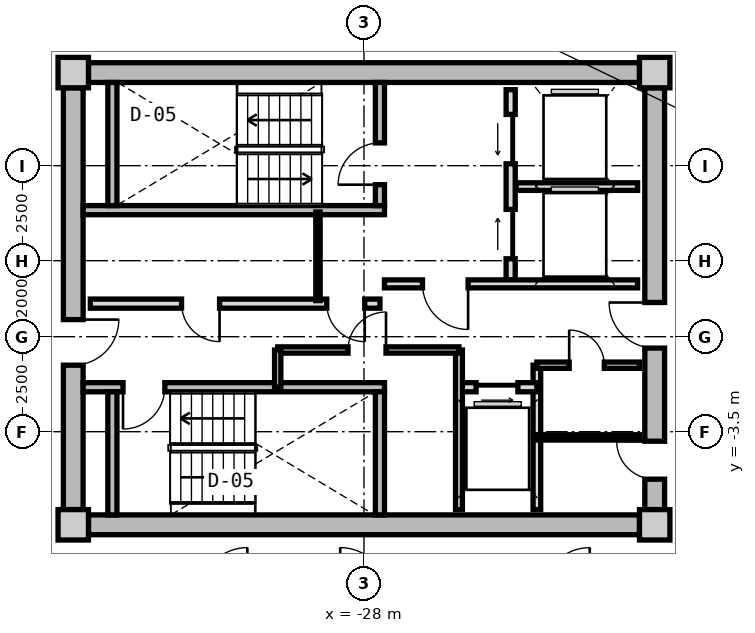
"""IFC4 building model, lengths in metres.
Left out: names, types, materials, properties, quantities, classifications, styles, units other than length and angle.
Written with IfcOpenShell. Run it as: python <this file> out.ifc"""

import sys

from ifc_helpers import new_model, si_unit, direction, frame, frame_2d, origin, origin_2d, place, context, subcontext, project, spatial, rectangle, extrude, source, transform, mapped, element, fill, save


model = new_model("IFC4")
c1 = context("Model", 3, precision=1e-05, world=origin(), true_north=direction((0.0, 1.0)))
c2 = subcontext(c1, "Body", "Model", "MODEL_VIEW")
j1 = project(units=[si_unit("LENGTHUNIT", "METRE"), si_unit("PLANEANGLEUNIT", "RADIAN")], contexts=[c1])
p1 = place(None, origin())
s1 = spatial("IfcSite", under=j1, at=p1, CompositionType="ELEMENT")
p2 = place(p1, origin())
s2 = spatial("IfcBuilding", under=s1, at=p2, CompositionType="ELEMENT")
p3 = place(p2, frame((0.0, 0.0, 210.85)))
s3 = spatial("IfcBuildingStorey", under=s2, at=p3, CompositionType="ELEMENT", Elevation=210.85)
m1 = source(origin(), c2, "Body", "SweptSolid", [
    extrude(rectangle(XDim=0.8, YDim=0.8, at=origin_2d()), origin(), (0.0, 0.0, 1.0), 3.05),
])
for number, where, z_axis, x_axis in (
    (1, (-35.65, -5.95, 0.0), (0.0, 0.0, 1.0), (1.0, 0.0, 0.0)),
    (2, (-20.35, -5.95, 0.0), (0.0, 0.0, 1.0), (1.0, 0.0, 0.0)),
    (3, (-20.35, 5.95, 0.0), (0.0, 0.0, 1.0), (1.0, 0.0, 0.0)),
    (4, (-35.65, 5.95, 0.0), (0.0, 0.0, 1.0), (1.0, 0.0, 0.0)),
):
    element("IfcColumn", number, at=place(p3, frame(where, z_axis=z_axis, x_axis=x_axis)), inside=s3, PredefinedType="COLUMN", context=c2, shape_type="MappedRepresentation", body=[
        mapped(m1, transform((0.0, 0.0, 0.0), x_axis=(1.0, 0.0, 0.0), y_axis=(0.0, 1.0, 0.0), z_axis=(0.0, 0.0, 1.0), scale=1.0)),
    ])
m2 = source(origin(), c2, "Body", "SweptSolid", [
    extrude(rectangle(XDim=14.5, YDim=0.52, at=frame_2d((7.25, 0.0))), origin(), (0.0, 0.0, 1.0), 2.76),
])
for number, where, z_axis, x_axis in (
    (5, (-35.25, 5.95, 0.0), (0.0, 0.0, 1.0), (1.0, 0.0, 0.0)),
    (6, (-20.75, -5.95, 0.0), (0.0, 0.0, 1.0), (-1.0, 0.0, 0.0)),
):
    element("IfcWall", number, at=place(p3, frame(where, z_axis=z_axis, x_axis=x_axis)), inside=s3, PredefinedType="SHEAR", context=c2, shape_type="MappedRepresentation", body=[
        mapped(m2, transform((0.0, 0.0, 0.0), x_axis=(1.0, 0.0, 0.0), y_axis=(0.0, 1.0, 0.0), z_axis=(0.0, 0.0, 1.0), scale=1.0)),
    ])
m3 = source(origin(), c2, "Body", "SweptSolid", [
    extrude(rectangle(XDim=11.1, YDim=0.52, at=frame_2d((5.55, 0.0))), origin(), (0.0, 0.0, 1.0), 2.76),
])
p4 = place(p3, frame((-35.65, -5.55, 0.0), z_axis=(0.0, 0.0, 1.0), x_axis=(0.0, 1.0, 0.0)))
e7 = element("IfcWall", 7, at=p4, inside=s3, PredefinedType="SHEAR", context=c2, shape_type="MappedRepresentation", body=[
    mapped(m3, transform((0.0, 0.0, 0.0), x_axis=(1.0, 0.0, 0.0), y_axis=(0.0, 1.0, 0.0), z_axis=(0.0, 0.0, 1.0), scale=1.0)),
])
p5 = place(p4, frame((3.8, 0.0, 0.0)))
e8 = element("IfcOpeningElement", 8, at=p5, cuts=e7, PredefinedType="OPENING", context=c2, shape_type="SweptSolid", body=[
    extrude(rectangle(XDim=1.2, YDim=2.15, at=frame_2d((0.6, 1.075))), frame((0.0, 0.27, 0.0), z_axis=(0.0, -1.0, 0.0), x_axis=(1.0, 0.0, 0.0)), (0.0, 0.0, 1.0), 0.54),
])
p6 = place(p3, frame((-20.35, 5.55, 0.0), z_axis=(0.0, 0.0, 1.0), x_axis=(0.0, -1.0, 0.0)))
e9 = element("IfcWall", 9, at=p6, inside=s3, PredefinedType="SHEAR", context=c2, shape_type="MappedRepresentation", body=[
    mapped(m3, transform((0.0, 0.0, 0.0), x_axis=(1.0, 0.0, 0.0), y_axis=(0.0, 1.0, 0.0), z_axis=(0.0, 0.0, 1.0), scale=1.0)),
])
p7 = place(p6, frame((5.65, 0.0, 0.0)))
e10 = element("IfcOpeningElement", 10, at=p7, cuts=e9, PredefinedType="OPENING", context=c2, shape_type="SweptSolid", body=[
    extrude(rectangle(XDim=1.2, YDim=2.15, at=frame_2d((0.6, 1.075))), frame((0.0, 0.27, 0.0), z_axis=(0.0, -1.0, 0.0), x_axis=(1.0, 0.0, 0.0)), (0.0, 0.0, 1.0), 0.54),
])
p8 = place(p6, frame((9.3, 0.0, 0.0)))
e11 = element("IfcOpeningElement", 11, at=p8, cuts=e9, PredefinedType="OPENING", context=c2, shape_type="SweptSolid", body=[
    extrude(rectangle(XDim=1.0, YDim=2.1, at=frame_2d((0.5, 1.05))), frame((0.0, 0.27, 0.0), z_axis=(0.0, -1.0, 0.0), x_axis=(1.0, 0.0, 0.0)), (0.0, 0.0, 1.0), 0.54),
])
m4 = source(origin(), c2, "Body", "SweptSolid", [
    extrude(rectangle(XDim=7.93, YDim=0.24, at=frame_2d((3.965, 0.0))), origin(), (0.0, 0.0, 1.0), 2.76),
])
p9 = place(p3, frame((-35.39, 2.33, 0.0), z_axis=(0.0, 0.0, 1.0), x_axis=(1.0, 0.0, 0.0)))
e12 = element("IfcWall", 12, at=p9, inside=s3, PredefinedType="PARTITIONING", context=c2, shape_type="MappedRepresentation", body=[
    mapped(m4, transform((0.0, 0.0, 0.0), x_axis=(1.0, 0.0, 0.0), y_axis=(0.0, 1.0, 0.0), z_axis=(0.0, 0.0, 1.0), scale=1.0)),
])
m5 = source(origin(), c2, "Body", "SweptSolid", [
    extrude(rectangle(XDim=3.24, YDim=0.24, at=frame_2d((1.62, 0.0))), origin(), (0.0, 0.0, 1.0), 2.76),
])
p10 = place(p3, frame((-34.62, 2.45, 0.0), z_axis=(0.0, 0.0, 1.0), x_axis=(0.0, 1.0, 0.0)))
e13 = element("IfcWall", 13, at=p10, inside=s3, PredefinedType="PARTITIONING", context=c2, shape_type="MappedRepresentation", body=[
    mapped(m5, transform((0.0, 0.0, 0.0), x_axis=(1.0, 0.0, 0.0), y_axis=(0.0, 1.0, 0.0), z_axis=(0.0, 0.0, 1.0), scale=1.0)),
])
p11 = place(p3, frame((-27.58, 2.45, 0.0), z_axis=(0.0, 0.0, 1.0), x_axis=(0.0, 1.0, 0.0)))
e14 = element("IfcWall", 14, at=p11, inside=s3, PredefinedType="PARTITIONING", context=c2, shape_type="MappedRepresentation", body=[
    mapped(m5, transform((0.0, 0.0, 0.0), x_axis=(1.0, 0.0, 0.0), y_axis=(0.0, 1.0, 0.0), z_axis=(0.0, 0.0, 1.0), scale=1.0)),
])
p12 = place(p11, frame((0.55, 0.0, 0.0)))
e15 = element("IfcOpeningElement", 15, at=p12, cuts=e14, PredefinedType="OPENING", context=c2, shape_type="SweptSolid", body=[
    extrude(rectangle(XDim=1.1, YDim=2.15, at=frame_2d((0.55, 1.075))), frame((0.0, 0.13, 0.0), z_axis=(0.0, -1.0, 0.0), x_axis=(1.0, 0.0, 0.0)), (0.0, 0.0, 1.0), 0.26),
])
p13 = place(p3, frame((-35.39, -2.33, 0.0), z_axis=(0.0, 0.0, 1.0), x_axis=(1.0, 0.0, 0.0)))
e16 = element("IfcWall", 16, at=p13, inside=s3, PredefinedType="PARTITIONING", context=c2, shape_type="MappedRepresentation", body=[
    mapped(m4, transform((0.0, 0.0, 0.0), x_axis=(1.0, 0.0, 0.0), y_axis=(0.0, 1.0, 0.0), z_axis=(0.0, 0.0, 1.0), scale=1.0)),
])
p14 = place(p13, frame((1.05, 0.0, 0.0)))
e17 = element("IfcOpeningElement", 17, at=p14, cuts=e16, PredefinedType="OPENING", context=c2, shape_type="SweptSolid", body=[
    extrude(rectangle(XDim=1.1, YDim=2.15, at=frame_2d((0.55, 1.075))), frame((0.0, 0.13, 0.0), z_axis=(0.0, -1.0, 0.0), x_axis=(1.0, 0.0, 0.0)), (0.0, 0.0, 1.0), 0.26),
])
for number, where, z_axis, x_axis in (
    (18, (-34.62, -5.69, 0.0), (0.0, 0.0, 1.0), (0.0, 1.0, 0.0)),
    (19, (-27.58, -5.69, 0.0), (0.0, 0.0, 1.0), (0.0, 1.0, 0.0)),
):
    element("IfcWall", number, at=place(p3, frame(where, z_axis=z_axis, x_axis=x_axis)), inside=s3, PredefinedType="PARTITIONING", context=c2, shape_type="MappedRepresentation", body=[
        mapped(m5, transform((0.0, 0.0, 0.0), x_axis=(1.0, 0.0, 0.0), y_axis=(0.0, 1.0, 0.0), z_axis=(0.0, 0.0, 1.0), scale=1.0)),
    ])
m6 = source(origin(), c2, "Body", "SweptSolid", [
    extrude(rectangle(XDim=5.0, YDim=0.24, at=frame_2d((2.5, 0.0))), origin(), (0.0, 0.0, 1.0), 2.745),
])
p15 = place(p3, frame((-24.14, 0.5, 0.0), z_axis=(0.0, 0.0, 1.0), x_axis=(0.0, 1.0, 0.0)))
e20 = element("IfcWall", 20, at=p15, inside=s3, PredefinedType="PARTITIONING", context=c2, shape_type="MappedRepresentation", body=[
    mapped(m6, transform((0.0, 0.0, 0.0), x_axis=(1.0, 0.0, 0.0), y_axis=(0.0, 1.0, 0.0), z_axis=(0.0, 0.0, 1.0), scale=1.0)),
])
p16 = place(p15, frame((3.05, 0.0, 0.0)))
e21 = element("IfcOpeningElement", 21, at=p16, cuts=e20, PredefinedType="OPENING", context=c2, shape_type="SweptSolid", body=[
    extrude(rectangle(XDim=1.3, YDim=2.2, at=frame_2d((0.65, 1.1))), frame((0.0, 0.13, 0.0), z_axis=(0.0, -1.0, 0.0), x_axis=(1.0, 0.0, 0.0)), (0.0, 0.0, 1.0), 0.26),
])
p17 = place(p15, frame((0.55, 0.0, 0.0)))
e22 = element("IfcOpeningElement", 22, at=p17, cuts=e20, PredefinedType="OPENING", context=c2, shape_type="SweptSolid", body=[
    extrude(rectangle(XDim=1.3, YDim=2.2, at=frame_2d((0.65, 1.1))), frame((0.0, 0.13, 0.0), z_axis=(0.0, -1.0, 0.0), x_axis=(1.0, 0.0, 0.0)), (0.0, 0.0, 1.0), 0.26),
])
m7 = source(origin(), c2, "Body", "SweptSolid", [
    extrude(rectangle(XDim=3.2, YDim=0.2, at=frame_2d((1.6, 0.0))), origin(), (0.0, 0.0, 1.0), 2.745),
])
p18 = place(p3, frame((-24.0, 2.95, 0.0), z_axis=(0.0, 0.0, 1.0), x_axis=(1.0, 0.0, 0.0)))
e23 = element("IfcWall", 23, at=p18, inside=s3, PredefinedType="PARTITIONING", context=c2, shape_type="MappedRepresentation", body=[
    mapped(m7, transform((0.0, 0.0, 0.0), x_axis=(1.0, 0.0, 0.0), y_axis=(0.0, 1.0, 0.0), z_axis=(0.0, 0.0, 1.0), scale=1.0)),
])
m8 = source(origin(), c2, "Body", "SweptSolid", [
    extrude(rectangle(XDim=6.66, YDim=0.21, at=frame_2d((3.33, 0.0))), origin(), (0.0, 0.0, 1.0), 2.745),
])
p19 = place(p3, frame((-27.46, 0.39, 0.0), z_axis=(0.0, 0.0, 1.0), x_axis=(1.0, 0.0, 0.0)))
e24 = element("IfcWall", 24, at=p19, inside=s3, PredefinedType="PARTITIONING", context=c2, shape_type="MappedRepresentation", body=[
    mapped(m8, transform((0.0, 0.0, 0.0), x_axis=(1.0, 0.0, 0.0), y_axis=(0.0, 1.0, 0.0), z_axis=(0.0, 0.0, 1.0), scale=1.0)),
])
p20 = place(p19, frame((1.0, 0.0, 0.0)))
e25 = element("IfcOpeningElement", 25, at=p20, cuts=e24, PredefinedType="OPENING", context=c2, shape_type="SweptSolid", body=[
    extrude(rectangle(XDim=1.2, YDim=2.15, at=frame_2d((0.6, 1.075))), frame((0.0, 0.115, 0.0), z_axis=(0.0, -1.0, 0.0), x_axis=(1.0, 0.0, 0.0)), (0.0, 0.0, 1.0), 0.23),
])
m9 = source(origin(), c2, "Body", "SweptSolid", [
    extrude(rectangle(XDim=7.62, YDim=0.24, at=frame_2d((3.81, 0.0))), origin(), (0.0, 0.0, 1.0), 2.745),
])
p21 = place(p3, frame((-35.2, -0.13, 0.0), z_axis=(0.0, 0.0, 1.0), x_axis=(1.0, 0.0, 0.0)))
e26 = element("IfcWall", 26, at=p21, inside=s3, PredefinedType="PARTITIONING", context=c2, shape_type="MappedRepresentation", body=[
    mapped(m9, transform((0.0, 0.0, 0.0), x_axis=(1.0, 0.0, 0.0), y_axis=(0.0, 1.0, 0.0), z_axis=(0.0, 0.0, 1.0), scale=1.0)),
])
p22 = place(p21, frame((6.22, 0.0, 0.0)))
e27 = element("IfcOpeningElement", 27, at=p22, cuts=e26, PredefinedType="OPENING", context=c2, shape_type="SweptSolid", body=[
    extrude(rectangle(XDim=1.0, YDim=2.1, at=frame_2d((0.5, 1.05))), frame((0.0, 0.13, 0.0), z_axis=(0.0, -1.0, 0.0), x_axis=(1.0, 0.0, 0.0)), (0.0, 0.0, 1.0), 0.26),
])
p23 = place(p21, frame((2.4, 0.0, 0.0)))
e28 = element("IfcOpeningElement", 28, at=p23, cuts=e26, PredefinedType="OPENING", context=c2, shape_type="SweptSolid", body=[
    extrude(rectangle(XDim=1.0, YDim=2.1, at=frame_2d((0.5, 1.05))), frame((0.0, 0.13, 0.0), z_axis=(0.0, -1.0, 0.0), x_axis=(1.0, 0.0, 0.0)), (0.0, 0.0, 1.0), 0.26),
])
m10 = source(origin(), c2, "Body", "SweptSolid", [
    extrude(rectangle(XDim=2.33, YDim=0.115, at=frame_2d((1.165, 0.0))), origin(), (0.0, 0.0, 1.0), 2.745),
])
p24 = place(p3, frame((-29.21, -0.05, 0.0), z_axis=(0.0, 0.0, 1.0), x_axis=(0.0, 1.0, 0.0)))
e29 = element("IfcWall", 29, at=p24, inside=s3, PredefinedType="PARTITIONING", context=c2, shape_type="MappedRepresentation", body=[
    mapped(m10, transform((0.0, 0.0, 0.0), x_axis=(1.0, 0.0, 0.0), y_axis=(0.0, 1.0, 0.0), z_axis=(0.0, 0.0, 1.0), scale=1.0)),
])
m11 = source(origin(), c2, "Body", "SweptSolid", [
    extrude(rectangle(XDim=3.8, YDim=0.2, at=frame_2d((1.9, 0.0))), origin(), (0.0, 0.0, 1.0), 2.745),
])
p25 = place(p3, frame((-23.45, -5.55, 0.0), z_axis=(0.0, 0.0, 1.0), x_axis=(0.0, 1.0, 0.0)))
e30 = element("IfcWall", 30, at=p25, inside=s3, PredefinedType="PARTITIONING", context=c2, shape_type="MappedRepresentation", body=[
    mapped(m11, transform((0.0, 0.0, 0.0), x_axis=(1.0, 0.0, 0.0), y_axis=(0.0, 1.0, 0.0), z_axis=(0.0, 0.0, 1.0), scale=1.0)),
])
m12 = source(origin(), c2, "Body", "SweptSolid", [
    extrude(rectangle(XDim=2.05, YDim=0.24, at=frame_2d((1.025, 0.0))), origin(), (0.0, 0.0, 1.0), 2.745),
])
p26 = place(p3, frame((-25.5, -2.33, 0.0), z_axis=(0.0, 0.0, 1.0), x_axis=(1.0, 0.0, 0.0)))
e31 = element("IfcWall", 31, at=p26, inside=s3, PredefinedType="PARTITIONING", context=c2, shape_type="MappedRepresentation", body=[
    mapped(m12, transform((0.0, 0.0, 0.0), x_axis=(1.0, 0.0, 0.0), y_axis=(0.0, 1.0, 0.0), z_axis=(0.0, 0.0, 1.0), scale=1.0)),
])
p27 = place(p26, frame((0.45, 0.0, 0.0)))
e32 = element("IfcOpeningElement", 32, at=p27, cuts=e31, PredefinedType="OPENING", context=c2, shape_type="SweptSolid", body=[
    extrude(rectangle(XDim=1.1, YDim=2.2, at=frame_2d((0.55, 1.1))), frame((0.0, 0.13, 0.0), z_axis=(0.0, -1.0, 0.0), x_axis=(1.0, 0.0, 0.0)), (0.0, 0.0, 1.0), 0.26),
])
m13 = source(origin(), c2, "Body", "SweptSolid", [
    extrude(rectangle(XDim=4.2, YDim=0.18, at=frame_2d((2.1, 0.0))), origin(), (0.0, 0.0, 1.0), 2.745),
])
p28 = place(p3, frame((-25.5, -5.55, 0.0), z_axis=(0.0, 0.0, 1.0), x_axis=(0.0, 1.0, 0.0)))
e33 = element("IfcWall", 33, at=p28, inside=s3, PredefinedType="PARTITIONING", context=c2, shape_type="MappedRepresentation", body=[
    mapped(m13, transform((0.0, 0.0, 0.0), x_axis=(1.0, 0.0, 0.0), y_axis=(0.0, 1.0, 0.0), z_axis=(0.0, 0.0, 1.0), scale=1.0)),
])
m14 = source(origin(), c2, "Body", "SweptSolid", [
    extrude(rectangle(XDim=4.77, YDim=0.165, at=frame_2d((2.385, 0.0))), origin(), (0.0, 0.0, 1.0), 2.745),
])
p29 = place(p3, frame((-30.27, -1.35, 0.0), z_axis=(0.0, 0.0, 1.0), x_axis=(1.0, 0.0, 0.0)))
e34 = element("IfcWall", 34, at=p29, inside=s3, PredefinedType="PARTITIONING", context=c2, shape_type="MappedRepresentation", body=[
    mapped(m14, transform((0.0, 0.0, 0.0), x_axis=(1.0, 0.0, 0.0), y_axis=(0.0, 1.0, 0.0), z_axis=(0.0, 0.0, 1.0), scale=1.0)),
])
p30 = place(p29, frame((1.85, 0.0, 0.0)))
e35 = element("IfcOpeningElement", 35, at=p30, cuts=e34, PredefinedType="OPENING", context=c2, shape_type="SweptSolid", body=[
    extrude(rectangle(XDim=1.0, YDim=2.1, at=frame_2d((0.5, 1.05))), frame((0.0, 0.093, 0.0), z_axis=(0.0, -1.0, 0.0), x_axis=(1.0, 0.0, 0.0)), (0.0, 0.0, 1.0), 0.185),
])
m15 = source(origin(), c2, "Body", "SweptSolid", [
    extrude(rectangle(XDim=0.98, YDim=0.165, at=frame_2d((0.49, 0.0))), origin(), (0.0, 0.0, 1.0), 2.745),
])
p31 = place(p3, frame((-30.27, -2.33, 0.0), z_axis=(0.0, 0.0, 1.0), x_axis=(0.0, 1.0, 0.0)))
e36 = element("IfcWall", 36, at=p31, inside=s3, PredefinedType="PARTITIONING", context=c2, shape_type="MappedRepresentation", body=[
    mapped(m15, transform((0.0, 0.0, 0.0), x_axis=(1.0, 0.0, 0.0), y_axis=(0.0, 1.0, 0.0), z_axis=(0.0, 0.0, 1.0), scale=1.0)),
])
m16 = source(origin(), c2, "Body", "SweptSolid", [
    extrude(rectangle(XDim=2.7, YDim=0.165, at=frame_2d((1.35, 0.0))), origin(), (0.0, 0.0, 1.0), 2.745),
])
p32 = place(p3, frame((-23.45, -1.75, 0.0), z_axis=(0.0, 0.0, 1.0), x_axis=(1.0, 0.0, 0.0)))
e37 = element("IfcWall", 37, at=p32, inside=s3, PredefinedType="PARTITIONING", context=c2, shape_type="MappedRepresentation", body=[
    mapped(m16, transform((0.0, 0.0, 0.0), x_axis=(1.0, 0.0, 0.0), y_axis=(0.0, 1.0, 0.0), z_axis=(0.0, 0.0, 1.0), scale=1.0)),
])
p33 = place(p32, frame((0.85, 0.0, 0.0)))
e38 = element("IfcOpeningElement", 38, at=p33, cuts=e37, PredefinedType="OPENING", context=c2, shape_type="SweptSolid", body=[
    extrude(rectangle(XDim=0.925, YDim=2.1, at=frame_2d((0.462, 1.05))), frame((0.0, 0.093, 0.0), z_axis=(0.0, -1.0, 0.0), x_axis=(1.0, 0.0, 0.0)), (0.0, 0.0, 1.0), 0.185),
])
m17 = source(origin(), c2, "Body", "SweptSolid", [
    extrude(rectangle(XDim=2.7, YDim=0.14, at=frame_2d((1.35, 0.0))), origin(), (0.0, 0.0, 1.0), 2.745),
])
p34 = place(p3, frame((-23.45, -3.65, 0.0), z_axis=(0.0, 0.0, 1.0), x_axis=(1.0, 0.0, 0.0)))
e39 = element("IfcWall", 39, at=p34, inside=s3, PredefinedType="PARTITIONING", context=c2, shape_type="MappedRepresentation", body=[
    mapped(m17, transform((0.0, 0.0, 0.0), x_axis=(1.0, 0.0, 0.0), y_axis=(0.0, 1.0, 0.0), z_axis=(0.0, 0.0, 1.0), scale=1.0)),
])
m18 = source(origin(), c2, "Body", "SweptSolid", [
    extrude(rectangle(XDim=1.1, YDim=2.15, at=frame_2d((0.55, 1.075))), frame((0.0, 0.025, 0.0), z_axis=(0.0, -1.0, 0.0), x_axis=(1.0, 0.0, 0.0)), (0.0, 0.0, 1.0), 0.05),
])
p35 = place(p12, origin())
e40 = element("IfcDoor", 40, at=p35, inside=s3, OperationType="SINGLE_SWING_LEFT", PredefinedType="DOOR", context=c2, shape_type="MappedRepresentation", body=[
    mapped(m18, transform((0.0, 0.0, 0.0), x_axis=(1.0, 0.0, 0.0), y_axis=(0.0, 1.0, 0.0), z_axis=(0.0, 0.0, 1.0), scale=1.0)),
])
fill(e15, e40)
p36 = place(p14, frame((1.1, 0.0, 0.0), z_axis=(0.0, 0.0, 1.0), x_axis=(-1.0, 0.0, 0.0)))
e41 = element("IfcDoor", 41, at=p36, inside=s3, OperationType="SINGLE_SWING_RIGHT", PredefinedType="DOOR", context=c2, shape_type="MappedRepresentation", body=[
    mapped(m18, transform((0.0, 0.0, 0.0), x_axis=(1.0, 0.0, 0.0), y_axis=(0.0, 1.0, 0.0), z_axis=(0.0, 0.0, 1.0), scale=1.0)),
])
fill(e17, e41)
m19 = source(origin(), c2, "Body", "SweptSolid", [
    extrude(rectangle(XDim=1.3, YDim=2.2, at=frame_2d((0.65, 1.1))), frame((0.0, 0.025, 0.0), z_axis=(0.0, -1.0, 0.0), x_axis=(1.0, 0.0, 0.0)), (0.0, 0.0, 1.0), 0.05),
])
p37 = place(p16, origin())
e42 = element("IfcDoor", 42, at=p37, inside=s3, OperationType="SLIDING_TO_LEFT", PredefinedType="DOOR", context=c2, shape_type="MappedRepresentation", body=[
    mapped(m19, transform((0.0, 0.0, 0.0), x_axis=(1.0, 0.0, 0.0), y_axis=(0.0, 1.0, 0.0), z_axis=(0.0, 0.0, 1.0), scale=1.0)),
])
fill(e21, e42)
p38 = place(p17, origin())
e43 = element("IfcDoor", 43, at=p38, inside=s3, OperationType="SLIDING_TO_RIGHT", PredefinedType="DOOR", context=c2, shape_type="MappedRepresentation", body=[
    mapped(m19, transform((0.0, 0.0, 0.0), x_axis=(1.0, 0.0, 0.0), y_axis=(0.0, 1.0, 0.0), z_axis=(0.0, 0.0, 1.0), scale=1.0)),
])
fill(e22, e43)
m20 = source(origin(), c2, "Body", "SweptSolid", [
    extrude(rectangle(XDim=1.2, YDim=2.15, at=frame_2d((0.6, 1.075))), frame((0.0, 0.025, 0.0), z_axis=(0.0, -1.0, 0.0), x_axis=(1.0, 0.0, 0.0)), (0.0, 0.0, 1.0), 0.05),
])
p39 = place(p20, frame((1.2, 0.0, 0.0), z_axis=(0.0, 0.0, 1.0), x_axis=(-1.0, 0.0, 0.0)))
e44 = element("IfcDoor", 44, at=p39, inside=s3, OperationType="SINGLE_SWING_LEFT", PredefinedType="DOOR", context=c2, shape_type="MappedRepresentation", body=[
    mapped(m20, transform((0.0, 0.0, 0.0), x_axis=(1.0, 0.0, 0.0), y_axis=(0.0, 1.0, 0.0), z_axis=(0.0, 0.0, 1.0), scale=1.0)),
])
fill(e25, e44)
p40 = place(p5, frame((1.2, 0.0, 0.0), z_axis=(0.0, 0.0, 1.0), x_axis=(-1.0, 0.0, 0.0)))
e45 = element("IfcDoor", 45, at=p40, inside=s3, OperationType="SINGLE_SWING_LEFT", PredefinedType="DOOR", context=c2, shape_type="MappedRepresentation", body=[
    mapped(m20, transform((0.0, 0.0, 0.0), x_axis=(1.0, 0.0, 0.0), y_axis=(0.0, 1.0, 0.0), z_axis=(0.0, 0.0, 1.0), scale=1.0)),
])
fill(e8, e45)
p41 = place(p7, frame((1.2, 0.0, 0.0), z_axis=(0.0, 0.0, 1.0), x_axis=(-1.0, 0.0, 0.0)))
e46 = element("IfcDoor", 46, at=p41, inside=s3, OperationType="SINGLE_SWING_RIGHT", PredefinedType="DOOR", context=c2, shape_type="MappedRepresentation", body=[
    mapped(m20, transform((0.0, 0.0, 0.0), x_axis=(1.0, 0.0, 0.0), y_axis=(0.0, 1.0, 0.0), z_axis=(0.0, 0.0, 1.0), scale=1.0)),
])
fill(e10, e46)
m21 = source(origin(), c2, "Body", "SweptSolid", [
    extrude(rectangle(XDim=1.0, YDim=2.1, at=frame_2d((0.5, 1.05))), frame((0.0, 0.025, 0.0), z_axis=(0.0, -1.0, 0.0), x_axis=(1.0, 0.0, 0.0)), (0.0, 0.0, 1.0), 0.05),
])
p42 = place(p22, frame((1.0, 0.0, 0.0), z_axis=(0.0, 0.0, 1.0), x_axis=(-1.0, 0.0, 0.0)))
e47 = element("IfcDoor", 47, at=p42, inside=s3, OperationType="SINGLE_SWING_LEFT", PredefinedType="DOOR", context=c2, shape_type="MappedRepresentation", body=[
    mapped(m21, transform((0.0, 0.0, 0.0), x_axis=(1.0, 0.0, 0.0), y_axis=(0.0, 1.0, 0.0), z_axis=(0.0, 0.0, 1.0), scale=1.0)),
])
fill(e27, e47)
p43 = place(p23, frame((1.0, 0.0, 0.0), z_axis=(0.0, 0.0, 1.0), x_axis=(-1.0, 0.0, 0.0)))
e48 = element("IfcDoor", 48, at=p43, inside=s3, OperationType="SINGLE_SWING_LEFT", PredefinedType="DOOR", context=c2, shape_type="MappedRepresentation", body=[
    mapped(m21, transform((0.0, 0.0, 0.0), x_axis=(1.0, 0.0, 0.0), y_axis=(0.0, 1.0, 0.0), z_axis=(0.0, 0.0, 1.0), scale=1.0)),
])
fill(e28, e48)
m22 = source(origin(), c2, "Body", "SweptSolid", [
    extrude(rectangle(XDim=1.1, YDim=2.2, at=frame_2d((0.55, 1.1))), frame((0.0, 0.025, 0.0), z_axis=(0.0, -1.0, 0.0), x_axis=(1.0, 0.0, 0.0)), (0.0, 0.0, 1.0), 0.05),
])
p44 = place(p27, frame((1.1, 0.0, 0.0), z_axis=(0.0, 0.0, 1.0), x_axis=(-1.0, 0.0, 0.0)))
e49 = element("IfcDoor", 49, at=p44, inside=s3, OperationType="SLIDING_TO_RIGHT", PredefinedType="DOOR", context=c2, shape_type="MappedRepresentation", body=[
    mapped(m22, transform((0.0, 0.0, 0.0), x_axis=(1.0, 0.0, 0.0), y_axis=(0.0, 1.0, 0.0), z_axis=(0.0, 0.0, 1.0), scale=1.0)),
])
fill(e32, e49)
p45 = place(p30, origin())
e50 = element("IfcDoor", 50, at=p45, inside=s3, OperationType="SINGLE_SWING_RIGHT", PredefinedType="DOOR", context=c2, shape_type="MappedRepresentation", body=[
    mapped(m21, transform((0.0, 0.0, 0.0), x_axis=(1.0, 0.0, 0.0), y_axis=(0.0, 1.0, 0.0), z_axis=(0.0, 0.0, 1.0), scale=1.0)),
])
fill(e35, e50)
m23 = source(origin(), c2, "Body", "SweptSolid", [
    extrude(rectangle(XDim=0.925, YDim=2.1, at=frame_2d((0.462, 1.05))), frame((0.0, 0.025, 0.0), z_axis=(0.0, -1.0, 0.0), x_axis=(1.0, 0.0, 0.0)), (0.0, 0.0, 1.0), 0.05),
])
p46 = place(p33, origin())
e51 = element("IfcDoor", 51, at=p46, inside=s3, OperationType="SINGLE_SWING_LEFT", PredefinedType="DOOR", context=c2, shape_type="MappedRepresentation", body=[
    mapped(m23, transform((0.0, 0.0, 0.0), x_axis=(1.0, 0.0, 0.0), y_axis=(0.0, 1.0, 0.0), z_axis=(0.0, 0.0, 1.0), scale=1.0)),
])
fill(e38, e51)
p47 = place(p8, frame((1.0, 0.0, 0.0), z_axis=(0.0, 0.0, 1.0), x_axis=(-1.0, 0.0, 0.0)))
e52 = element("IfcDoor", 52, at=p47, inside=s3, OperationType="SINGLE_SWING_RIGHT", PredefinedType="DOOR", context=c2, shape_type="MappedRepresentation", body=[
    mapped(m21, transform((0.0, 0.0, 0.0), x_axis=(1.0, 0.0, 0.0), y_axis=(0.0, 1.0, 0.0), z_axis=(0.0, 0.0, 1.0), scale=1.0)),
])
fill(e11, e52)
save(model, sys.argv[1])
